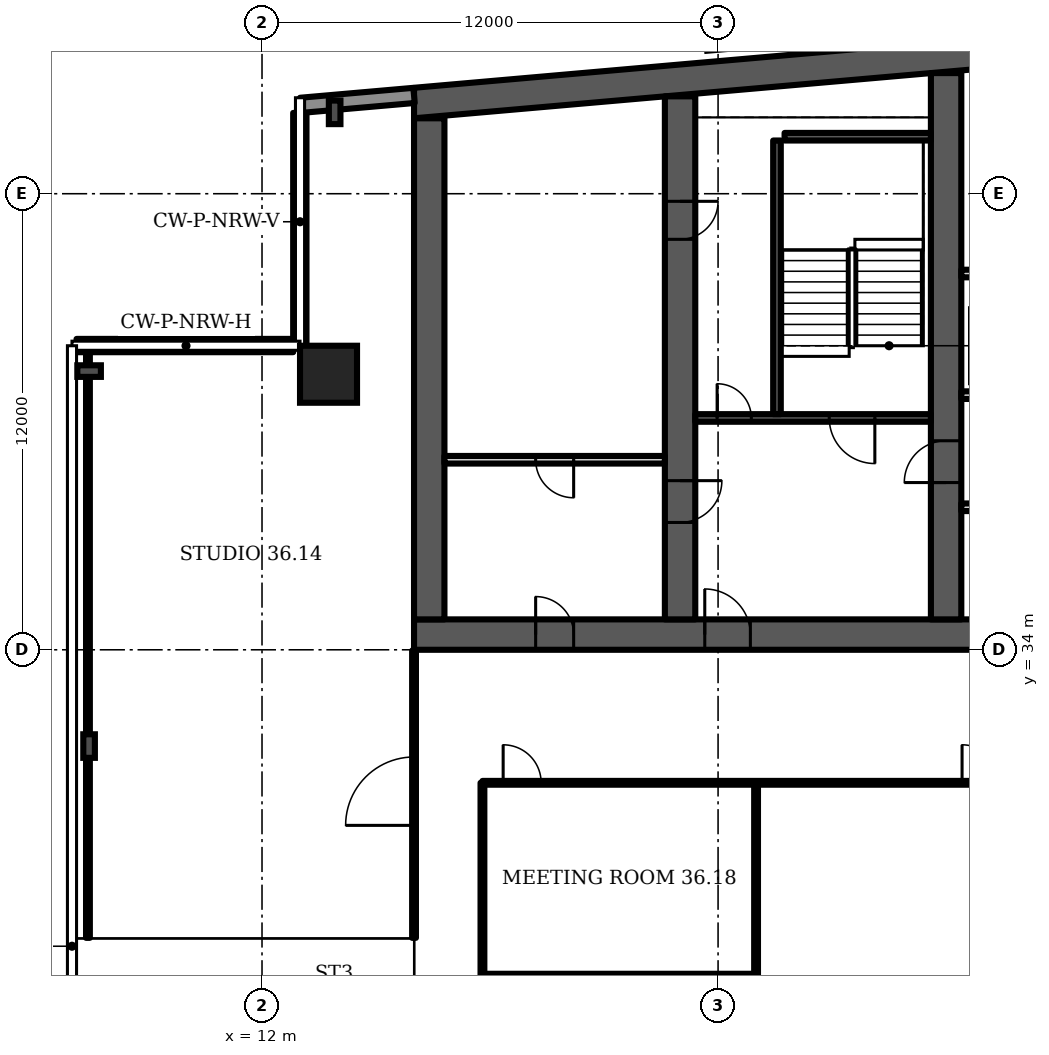
"""IFC4 building model, lengths in metres.
Left out: names, types, materials, properties, quantities, classifications, styles, units other than length and angle.
Written with IfcOpenShell. Run it as: python <this file> out.ifc"""

import sys

from ifc_helpers import new_model, si_unit, direction, frame, frame_2d, origin, origin_2d, place, context, subcontext, project, spatial, polyline, rectangle, i_section, outline, extrude, element, fill, save


model = new_model("IFC4")
c1 = context("Model", 3, precision=1e-05, world=origin(), true_north=direction((0.0, 1.0)))
c2 = subcontext(c1, "Body", "Model", "MODEL_VIEW")
j1 = project(units=[si_unit("LENGTHUNIT", "METRE"), si_unit("PLANEANGLEUNIT", "RADIAN")], contexts=[c1])
p1 = place(None, origin())
s1 = spatial("IfcSite", under=j1, at=p1, CompositionType="ELEMENT")
p2 = place(p1, origin())
s2 = spatial("IfcBuilding", under=s1, at=p2, CompositionType="ELEMENT")
p3 = place(p2, frame((0.0, 0.0, 151.9)))
s3 = spatial("IfcBuildingStorey", under=s2, at=p3, CompositionType="ELEMENT", Elevation=151.9)
p4 = place(p3, origin())
e1 = element("IfcWall", 1, at=p4, inside=s3, PredefinedType="SHEAR", context=c2, shape_type="SweptSolid", body=[
    extrude(outline(polyline([(16.0, 47.984), (37.0, 49.822), (58.0, 47.984), (58.0, 48.787), (37.0, 50.625), (16.0, 48.787), (16.0, 47.984)])), origin(), (0.0, 0.0, 1.0), 3.6),
])
p5 = place(p3, frame((16.0, 34.4, 0.0), z_axis=(0.0, 0.0, 1.0), x_axis=(1.0, 0.0, 0.0)))
e2 = element("IfcWall", 2, at=p5, inside=s3, PredefinedType="SHEAR", context=c2, shape_type="SweptSolid", body=[
    extrude(rectangle(XDim=42.0, YDim=0.8, at=frame_2d((21.0, 0.0))), origin(), (0.0, 0.0, 1.0), 3.6),
])
p6 = place(p5, frame((3.2, 0.0, 0.0)))
e3 = element("IfcOpeningElement", 3, at=p6, cuts=e2, PredefinedType="OPENING", context=c2, shape_type="SweptSolid", body=[
    extrude(rectangle(XDim=1.0, YDim=2.1, at=frame_2d((0.5, 1.05))), frame((0.0, 0.41, 0.0), z_axis=(0.0, -1.0, 0.0), x_axis=(1.0, 0.0, 0.0)), (0.0, 0.0, 1.0), 0.82),
])
p7 = place(p5, frame((7.65, 0.0, 0.0)))
e4 = element("IfcOpeningElement", 4, at=p7, cuts=e2, PredefinedType="OPENING", context=c2, shape_type="SweptSolid", body=[
    extrude(rectangle(XDim=1.2, YDim=2.1, at=frame_2d((0.6, 1.05))), frame((0.0, 0.41, 0.0), z_axis=(0.0, -1.0, 0.0), x_axis=(1.0, 0.0, 0.0)), (0.0, 0.0, 1.0), 0.82),
])
p8 = place(p5, frame((14.767, 0.0, 0.0)))
e5 = element("IfcOpeningElement", 5, at=p8, cuts=e2, PredefinedType="OPENING", context=c2, shape_type="SweptSolid", body=[
    extrude(rectangle(XDim=1.1, YDim=2.1, at=frame_2d((0.55, 1.05))), frame((0.0, 0.41, 0.0), z_axis=(0.0, -1.0, 0.0), x_axis=(1.0, 0.0, 0.0)), (0.0, 0.0, 1.0), 0.82),
])
p9 = place(p5, frame((19.133, 0.0, 0.0)))
e6 = element("IfcOpeningElement", 6, at=p9, cuts=e2, PredefinedType="OPENING", context=c2, shape_type="SweptSolid", body=[
    extrude(rectangle(XDim=1.1, YDim=2.1, at=frame_2d((0.55, 1.05))), frame((0.0, 0.41, 0.0), z_axis=(0.0, -1.0, 0.0), x_axis=(1.0, 0.0, 0.0)), (0.0, 0.0, 1.0), 0.82),
])
p10 = place(p5, frame((16.8, 0.0, 0.0)))
e7 = element("IfcOpeningElement", 7, at=p10, cuts=e2, PredefinedType="OPENING", context=c2, shape_type="SweptSolid", body=[
    extrude(rectangle(XDim=1.4, YDim=2.1, at=frame_2d((0.7, 1.05))), frame((0.0, 0.41, 0.0), z_axis=(0.0, -1.0, 0.0), x_axis=(1.0, 0.0, 0.0)), (0.0, 0.0, 1.0), 0.82),
])
p11 = place(p5, frame((21.767, 0.0, 0.0)))
e8 = element("IfcOpeningElement", 8, at=p11, cuts=e2, PredefinedType="OPENING", context=c2, shape_type="SweptSolid", body=[
    extrude(rectangle(XDim=1.1, YDim=2.1, at=frame_2d((0.55, 1.05))), frame((0.0, 0.41, 0.0), z_axis=(0.0, -1.0, 0.0), x_axis=(1.0, 0.0, 0.0)), (0.0, 0.0, 1.0), 0.82),
])
p12 = place(p5, frame((23.95, 0.0, 0.0)))
e9 = element("IfcOpeningElement", 9, at=p12, cuts=e2, PredefinedType="OPENING", context=c2, shape_type="SweptSolid", body=[
    extrude(rectangle(XDim=1.1, YDim=2.1, at=frame_2d((0.55, 1.05))), frame((0.0, 0.41, 0.0), z_axis=(0.0, -1.0, 0.0), x_axis=(1.0, 0.0, 0.0)), (0.0, 0.0, 1.0), 0.82),
])
p13 = place(p5, frame((26.133, 0.0, 0.0)))
e10 = element("IfcOpeningElement", 10, at=p13, cuts=e2, PredefinedType="OPENING", context=c2, shape_type="SweptSolid", body=[
    extrude(rectangle(XDim=1.1, YDim=2.1, at=frame_2d((0.55, 1.05))), frame((0.0, 0.41, 0.0), z_axis=(0.0, -1.0, 0.0), x_axis=(1.0, 0.0, 0.0)), (0.0, 0.0, 1.0), 0.82),
])
p14 = place(p5, frame((33.15, 0.0, 0.0)))
e11 = element("IfcOpeningElement", 11, at=p14, cuts=e2, PredefinedType="OPENING", context=c2, shape_type="SweptSolid", body=[
    extrude(rectangle(XDim=1.2, YDim=2.1, at=frame_2d((0.6, 1.05))), frame((0.0, 0.41, 0.0), z_axis=(0.0, -1.0, 0.0), x_axis=(1.0, 0.0, 0.0)), (0.0, 0.0, 1.0), 0.82),
])
p15 = place(p5, frame((35.817, 0.0, 0.0)))
e12 = element("IfcOpeningElement", 12, at=p15, cuts=e2, PredefinedType="OPENING", context=c2, shape_type="SweptSolid", body=[
    extrude(rectangle(XDim=1.0, YDim=2.1, at=frame_2d((0.5, 1.05))), frame((0.0, 0.41, 0.0), z_axis=(0.0, -1.0, 0.0), x_axis=(1.0, 0.0, 0.0)), (0.0, 0.0, 1.0), 0.82),
])
p16 = place(p5, frame((39.95, 0.0, 0.0)))
e13 = element("IfcOpeningElement", 13, at=p16, cuts=e2, PredefinedType="OPENING", context=c2, shape_type="SweptSolid", body=[
    extrude(rectangle(XDim=1.0, YDim=2.1, at=frame_2d((0.5, 1.05))), frame((0.0, 0.41, 0.0), z_axis=(0.0, -1.0, 0.0), x_axis=(1.0, 0.0, 0.0)), (0.0, 0.0, 1.0), 0.82),
])
p17 = place(p5, frame((37.767, 0.0, 0.0)))
e14 = element("IfcOpeningElement", 14, at=p17, cuts=e2, PredefinedType="OPENING", context=c2, shape_type="SweptSolid", body=[
    extrude(rectangle(XDim=1.4, YDim=2.1, at=frame_2d((0.7, 1.05))), frame((0.0, 0.41, 0.0), z_axis=(0.0, -1.0, 0.0), x_axis=(1.0, 0.0, 0.0)), (0.0, 0.0, 1.0), 0.82),
])
p18 = place(p3, frame((16.4, 34.8, 0.0), z_axis=(0.0, 0.0, 1.0), x_axis=(0.0, 1.0, 0.0)))
e15 = element("IfcWall", 15, at=p18, inside=s3, PredefinedType="SHEAR", context=c2, shape_type="SweptSolid", body=[
    extrude(rectangle(XDim=13.184, YDim=0.8, at=frame_2d((6.592, 0.0))), origin(), (0.0, 0.0, 1.0), 3.6),
])
p19 = place(p3, frame((23.0, 34.8, 0.0), z_axis=(0.0, 0.0, 1.0), x_axis=(0.0, 1.0, 0.0)))
e16 = element("IfcWall", 16, at=p19, inside=s3, PredefinedType="SHEAR", context=c2, shape_type="SweptSolid", body=[
    extrude(rectangle(XDim=13.762, YDim=0.8, at=frame_2d((6.881, 0.0))), origin(), (0.0, 0.0, 1.0), 3.6),
])
p20 = place(p19, frame((2.55, 0.0, 0.0)))
e17 = element("IfcOpeningElement", 17, at=p20, cuts=e16, PredefinedType="OPENING", context=c2, shape_type="SweptSolid", body=[
    extrude(rectangle(XDim=1.1, YDim=2.1, at=frame_2d((0.55, 1.05))), frame((0.0, 0.41, 0.0), z_axis=(0.0, -1.0, 0.0), x_axis=(1.0, 0.0, 0.0)), (0.0, 0.0, 1.0), 0.82),
])
p21 = place(p19, frame((10.0, 0.0, 0.0)))
e18 = element("IfcOpeningElement", 18, at=p21, cuts=e16, PredefinedType="OPENING", context=c2, shape_type="SweptSolid", body=[
    extrude(rectangle(XDim=1.0, YDim=2.1, at=frame_2d((0.5, 1.05))), frame((0.0, 0.41, 0.0), z_axis=(0.0, -1.0, 0.0), x_axis=(1.0, 0.0, 0.0)), (0.0, 0.0, 1.0), 0.82),
])
p22 = place(p3, frame((30.0, 34.8, 0.0), z_axis=(0.0, 0.0, 1.0), x_axis=(0.0, 1.0, 0.0)))
e19 = element("IfcWall", 19, at=p22, inside=s3, PredefinedType="SHEAR", context=c2, shape_type="SweptSolid", body=[
    extrude(rectangle(XDim=14.374, YDim=0.8, at=frame_2d((7.187, 0.0))), origin(), (0.0, 0.0, 1.0), 3.6),
])
p23 = place(p22, frame((3.6, 0.0, 0.0)))
e20 = element("IfcOpeningElement", 20, at=p23, cuts=e19, PredefinedType="OPENING", context=c2, shape_type="SweptSolid", body=[
    extrude(rectangle(XDim=1.1, YDim=2.1, at=frame_2d((0.55, 1.05))), frame((0.0, 0.41, 0.0), z_axis=(0.0, -1.0, 0.0), x_axis=(1.0, 0.0, 0.0)), (0.0, 0.0, 1.0), 0.82),
])
p24 = place(p3, frame((13.75, 41.25, 0.0), z_axis=(0.0, 0.0, 1.0), x_axis=(1.0, 0.0, 0.0)))
e21 = element("IfcColumn", 21, at=p24, inside=s3, PredefinedType="COLUMN", context=c2, shape_type="SweptSolid", body=[
    extrude(rectangle(XDim=1.5, YDim=1.5, at=origin_2d()), origin(), (0.0, 0.0, 1.0), 3.6),
])
for number, where, z_axis, x_axis in (
    (22, (13.911, 48.141, 0.0), (0.0, 0.0, 1.0), (-1.0, 0.0, 0.0)),
    (23, (7.45, 41.333, 0.0), (0.0, 0.0, 1.0), (0.0, 1.0, 0.0)),
    (24, (7.45, 31.467, 0.0), (0.0, 0.0, 1.0), (-1.0, 0.0, 0.0)),
):
    element("IfcColumn", number, at=place(p3, frame(where, z_axis=z_axis, x_axis=x_axis)), inside=s3, PredefinedType="COLUMN", context=c2, shape_type="SweptSolid", body=[
        extrude(i_section(OverallWidth=0.305, OverallDepth=0.62, WebThickness=0.021, FlangeThickness=0.04, FilletRadius=0.027, at=origin_2d()), origin(), (0.0, 0.0, 1.0), 3.6),
    ])
p25 = place(p3, frame((16.0, 48.587, 0.0), z_axis=(0.0, 0.0, 1.0), x_axis=(-0.996194, -0.087168, 0.0)))
e25 = element("IfcWall", 25, at=p25, inside=s3, PredefinedType="SOLIDWALL", context=c2, shape_type="SweptSolid", body=[
    extrude(rectangle(XDim=2.994, YDim=0.4, at=frame_2d((1.497, 0.0))), origin(), (0.0, 0.0, 1.0), 3.2),
])
p26 = place(p3, frame((12.995, 48.126, 0.0), z_axis=(0.0, 0.0, 1.0), x_axis=(0.0, -1.0, 0.0)))
e26 = element("IfcWall", 26, at=p26, inside=s3, PredefinedType="SOLIDWALL", context=c2, shape_type="SweptSolid", body=[
    extrude(rectangle(XDim=6.126, YDim=0.35, at=frame_2d((3.063, 0.0))), origin(), (0.0, 0.0, 1.0), 1.0),
])
p27 = place(p3, frame((12.82, 42.005, 0.0), z_axis=(0.0, 0.0, 1.0), x_axis=(-1.0, 0.0, 0.0)))
e27 = element("IfcWall", 27, at=p27, inside=s3, PredefinedType="SOLIDWALL", context=c2, shape_type="SweptSolid", body=[
    extrude(rectangle(XDim=5.7, YDim=0.35, at=frame_2d((2.85, 0.0))), origin(), (0.0, 0.0, 1.0), 1.0),
])
p28 = place(p3, frame((16.8, 39.0, 0.0), z_axis=(0.0, 0.0, 1.0), x_axis=(1.0, 0.0, 0.0)))
e28 = element("IfcWall", 28, at=p28, inside=s3, PredefinedType="PARTITIONING", context=c2, shape_type="SweptSolid", body=[
    extrude(rectangle(XDim=5.8, YDim=0.2, at=frame_2d((2.9, 0.0))), origin(), (0.0, 0.0, 1.0), 3.2),
])
p29 = place(p28, frame((2.4, 0.0, 0.0)))
e29 = element("IfcOpeningElement", 29, at=p29, cuts=e28, PredefinedType="OPENING", context=c2, shape_type="SweptSolid", body=[
    extrude(rectangle(XDim=1.0, YDim=2.1, at=frame_2d((0.5, 1.05))), frame((0.0, 0.11, 0.0), z_axis=(0.0, -1.0, 0.0), x_axis=(1.0, 0.0, 0.0)), (0.0, 0.0, 1.0), 0.22),
])
p30 = place(p3, frame((23.4, 40.1, 0.0), z_axis=(0.0, 0.0, 1.0), x_axis=(1.0, 0.0, 0.0)))
e30 = element("IfcWall", 30, at=p30, inside=s3, PredefinedType="SHEAR", context=c2, shape_type="SweptSolid", body=[
    extrude(rectangle(XDim=6.2, YDim=0.2, at=frame_2d((3.1, 0.0))), origin(), (0.0, 0.0, 1.0), 3.2),
])
p31 = place(p30, frame((3.525, 0.0, 0.0)))
e31 = element("IfcOpeningElement", 31, at=p31, cuts=e30, PredefinedType="OPENING", context=c2, shape_type="SweptSolid", body=[
    extrude(rectangle(XDim=1.2, YDim=2.1, at=frame_2d((0.6, 1.05))), frame((0.0, 0.11, 0.0), z_axis=(0.0, -1.0, 0.0), x_axis=(1.0, 0.0, 0.0)), (0.0, 0.0, 1.0), 0.22),
])
p32 = place(p30, frame((0.575, 0.0, 0.0)))
e32 = element("IfcOpeningElement", 32, at=p32, cuts=e30, PredefinedType="OPENING", context=c2, shape_type="SweptSolid", body=[
    extrude(rectangle(XDim=0.9, YDim=2.1, at=frame_2d((0.45, 1.05))), frame((0.0, 0.11, 0.0), z_axis=(0.0, -1.0, 0.0), x_axis=(1.0, 0.0, 0.0)), (0.0, 0.0, 1.0), 0.22),
])
p33 = place(p3, frame((25.55, 40.2, 0.0), z_axis=(0.0, 0.0, 1.0), x_axis=(0.0, 1.0, 0.0)))
e33 = element("IfcWall", 33, at=p33, inside=s3, PredefinedType="SHEAR", context=c2, shape_type="SweptSolid", body=[
    extrude(rectangle(XDim=7.2, YDim=0.2, at=frame_2d((3.6, 0.0))), origin(), (0.0, 0.0, 1.0), 3.2),
])
p34 = place(p3, frame((25.75, 47.5, 0.0), z_axis=(0.0, 0.0, 1.0), x_axis=(1.0, 0.0, 0.0)))
e34 = element("IfcWall", 34, at=p34, inside=s3, PredefinedType="SHEAR", context=c2, shape_type="SweptSolid", body=[
    extrude(rectangle(XDim=3.85, YDim=0.2, at=frame_2d((1.925, 0.0))), origin(), (0.0, 0.0, 1.0), 3.2),
])
p35 = place(p3, frame((30.4, 40.7, 0.0), z_axis=(0.0, 0.0, 1.0), x_axis=(1.0, 0.0, 0.0)))
e35 = element("IfcWall", 35, at=p35, inside=s3, PredefinedType="PARTITIONING", context=c2, shape_type="SweptSolid", body=[
    extrude(rectangle(XDim=6.2, YDim=0.2, at=frame_2d((3.1, 0.0))), origin(), (0.0, 0.0, 1.0), 3.2),
])
p36 = place(p35, frame((0.367, 0.0, 0.0)))
e36 = element("IfcOpeningElement", 36, at=p36, cuts=e35, PredefinedType="OPENING", context=c2, shape_type="SweptSolid", body=[
    extrude(rectangle(XDim=1.1, YDim=2.1, at=frame_2d((0.55, 1.05))), frame((0.0, 0.11, 0.0), z_axis=(0.0, -1.0, 0.0), x_axis=(1.0, 0.0, 0.0)), (0.0, 0.0, 1.0), 0.22),
])
p37 = place(p35, frame((2.55, 0.0, 0.0)))
e37 = element("IfcOpeningElement", 37, at=p37, cuts=e35, PredefinedType="OPENING", context=c2, shape_type="SweptSolid", body=[
    extrude(rectangle(XDim=1.1, YDim=2.1, at=frame_2d((0.55, 1.05))), frame((0.0, 0.11, 0.0), z_axis=(0.0, -1.0, 0.0), x_axis=(1.0, 0.0, 0.0)), (0.0, 0.0, 1.0), 0.22),
])
p38 = place(p35, frame((4.733, 0.0, 0.0)))
e38 = element("IfcOpeningElement", 38, at=p38, cuts=e35, PredefinedType="OPENING", context=c2, shape_type="SweptSolid", body=[
    extrude(rectangle(XDim=1.1, YDim=2.1, at=frame_2d((0.55, 1.05))), frame((0.0, 0.11, 0.0), z_axis=(0.0, -1.0, 0.0), x_axis=(1.0, 0.0, 0.0)), (0.0, 0.0, 1.0), 0.22),
])
p39 = place(p3, origin())
e39 = element("IfcWall", 39, at=p39, inside=s3, PredefinedType="PARTITIONING", context=c2, shape_type="SweptSolid", body=[
    extrude(outline(polyline([(32.233, 37.65), (30.4, 37.65), (30.4, 37.85), (32.233, 37.85), (32.433, 37.85), (32.433, 34.8), (32.233, 34.8), (32.233, 37.65)])), origin(), (0.0, 0.0, 1.0), 3.2),
])
p40 = place(p3, origin())
e40 = element("IfcWall", 40, at=p40, inside=s3, PredefinedType="PARTITIONING", context=c2, shape_type="SweptSolid", body=[
    extrude(outline(polyline([(32.433, 40.8), (32.233, 40.8), (32.233, 43.8), (30.4, 43.8), (30.4, 44.0), (36.6, 44.0), (36.6, 43.8), (34.767, 43.8), (34.767, 40.8), (34.567, 40.8), (34.567, 43.8), (32.433, 43.8), (32.433, 40.8)])), origin(), (0.0, 0.0, 1.0), 3.2),
])
p41 = place(p3, frame((7.42, 26.42, 0.0), z_axis=(0.0, 0.0, 1.0), x_axis=(0.0, 1.0, 0.0)))
e41 = element("IfcWall", 41, at=p41, inside=s3, PredefinedType="PARTITIONING", context=c2, shape_type="SweptSolid", body=[
    extrude(rectangle(XDim=15.56, YDim=0.1, at=frame_2d((7.78, 0.0))), origin(), (0.0, 0.0, 1.0), 2.58),
])
p42 = place(p3, frame((16.0, 26.42, 0.0), z_axis=(0.0, 0.0, 1.0), x_axis=(0.0, 1.0, 0.0)))
e42 = element("IfcWall", 42, at=p42, inside=s3, PredefinedType="PARTITIONING", context=c2, shape_type="SweptSolid", body=[
    extrude(rectangle(XDim=7.56, YDim=0.1, at=frame_2d((3.78, 0.0))), origin(), (0.0, 0.0, 1.0), 3.2),
])
p43 = place(p42, frame((2.96, 0.0, 0.0)))
e43 = element("IfcOpeningElement", 43, at=p43, cuts=e42, PredefinedType="OPENING", context=c2, shape_type="SweptSolid", body=[
    extrude(rectangle(XDim=1.8, YDim=2.1, at=frame_2d((0.9, 1.05))), frame((0.0, 0.06, 0.0), z_axis=(0.0, -1.0, 0.0), x_axis=(1.0, 0.0, 0.0)), (0.0, 0.0, 1.0), 0.12),
])
p44 = place(p3, frame((17.8, 24.135, 0.0), z_axis=(0.0, 0.0, 1.0), x_axis=(0.0, 1.0, 0.0)))
e44 = element("IfcWall", 44, at=p44, inside=s3, PredefinedType="PARTITIONING", context=c2, shape_type="SweptSolid", body=[
    extrude(rectangle(XDim=6.365, YDim=0.1, at=frame_2d((3.183, 0.0))), origin(), (0.0, 0.0, 1.0), 3.2),
])
p45 = place(p3, frame((17.8, 25.425, 0.0), z_axis=(0.0, 0.0, 1.0), x_axis=(1.0, 0.0, 0.0)))
e45 = element("IfcWall", 45, at=p45, inside=s3, PredefinedType="PARTITIONING", context=c2, shape_type="SweptSolid", body=[
    extrude(rectangle(XDim=7.2, YDim=0.1, at=frame_2d((3.6, 0.0))), origin(), (0.0, 0.0, 1.0), 3.2),
])
p46 = place(p3, frame((17.8, 30.5, 0.0), z_axis=(0.0, 0.0, 1.0), x_axis=(1.0, 0.0, 0.0)))
e46 = element("IfcWall", 46, at=p46, inside=s3, PredefinedType="PARTITIONING", context=c2, shape_type="SweptSolid", body=[
    extrude(rectangle(XDim=19.05, YDim=0.1, at=frame_2d((9.525, 0.0))), origin(), (0.0, 0.0, 1.0), 3.2),
])
p47 = place(p46, frame((0.545, 0.0, 0.0)))
e47 = element("IfcOpeningElement", 47, at=p47, cuts=e46, PredefinedType="OPENING", context=c2, shape_type="SweptSolid", body=[
    extrude(rectangle(XDim=1.0, YDim=2.1, at=frame_2d((0.5, 1.05))), frame((0.0, 0.06, 0.0), z_axis=(0.0, -1.0, 0.0), x_axis=(1.0, 0.0, 0.0)), (0.0, 0.0, 1.0), 0.12),
])
p48 = place(p46, frame((12.62, 0.0, 0.0)))
e48 = element("IfcOpeningElement", 48, at=p48, cuts=e46, PredefinedType="OPENING", context=c2, shape_type="SweptSolid", body=[
    extrude(rectangle(XDim=1.0, YDim=2.1, at=frame_2d((0.5, 1.05))), frame((0.0, 0.06, 0.0), z_axis=(0.0, -1.0, 0.0), x_axis=(1.0, 0.0, 0.0)), (0.0, 0.0, 1.0), 0.12),
])
p49 = place(p3, frame((25.0, 15.27, 0.0), z_axis=(0.0, 0.0, 1.0), x_axis=(0.0, 1.0, 0.0)))
e49 = element("IfcWall", 49, at=p49, inside=s3, PredefinedType="PARTITIONING", context=c2, shape_type="SweptSolid", body=[
    extrude(rectangle(XDim=15.23, YDim=0.1, at=frame_2d((7.615, 0.0))), origin(), (0.0, 0.0, 1.0), 3.2),
])
p50 = place(p6, origin())
e50 = element("IfcDoor", 50, at=p50, inside=s3, OperationType="SINGLE_SWING_LEFT", PredefinedType="DOOR", context=c2, shape_type="SweptSolid", body=[
    extrude(rectangle(XDim=1.0, YDim=2.1, at=frame_2d((0.5, 1.05))), frame((0.0, 0.4, 0.0), z_axis=(0.0, -1.0, 0.0), x_axis=(1.0, 0.0, 0.0)), (0.0, 0.0, 1.0), 0.8),
])
fill(e3, e50)
p51 = place(p29, origin())
e51 = element("IfcDoor", 51, at=p51, inside=s3, OperationType="SINGLE_SWING_RIGHT", PredefinedType="DOOR", context=c2, shape_type="SweptSolid", body=[
    extrude(rectangle(XDim=1.0, YDim=2.1, at=frame_2d((0.5, 1.05))), frame((0.0, 0.025, 0.0), z_axis=(0.0, -1.0, 0.0), x_axis=(1.0, 0.0, 0.0)), (0.0, 0.0, 1.0), 0.05),
])
fill(e29, e51)
p52 = place(p31, origin())
e52 = element("IfcDoor", 52, at=p52, inside=s3, OperationType="SINGLE_SWING_RIGHT", PredefinedType="DOOR", context=c2, shape_type="SweptSolid", body=[
    extrude(rectangle(XDim=1.2, YDim=2.1, at=frame_2d((0.6, 1.05))), frame((0.0, 0.025, 0.0), z_axis=(0.0, -1.0, 0.0), x_axis=(1.0, 0.0, 0.0)), (0.0, 0.0, 1.0), 0.05),
])
fill(e31, e52)
p53 = place(p32, origin())
e53 = element("IfcDoor", 53, at=p53, inside=s3, OperationType="SINGLE_SWING_LEFT", PredefinedType="DOOR", context=c2, shape_type="SweptSolid", body=[
    extrude(rectangle(XDim=0.9, YDim=2.1, at=frame_2d((0.45, 1.05))), frame((0.0, 0.025, 0.0), z_axis=(0.0, -1.0, 0.0), x_axis=(1.0, 0.0, 0.0)), (0.0, 0.0, 1.0), 0.05),
])
fill(e32, e53)
p54 = place(p7, origin())
e54 = element("IfcDoor", 54, at=p54, inside=s3, OperationType="SINGLE_SWING_LEFT", PredefinedType="DOOR", context=c2, shape_type="SweptSolid", body=[
    extrude(rectangle(XDim=1.2, YDim=2.1, at=frame_2d((0.6, 1.05))), frame((0.0, 0.025, 0.0), z_axis=(0.0, -1.0, 0.0), x_axis=(1.0, 0.0, 0.0)), (0.0, 0.0, 1.0), 0.05),
])
fill(e4, e54)
p55 = place(p20, origin())
e55 = element("IfcDoor", 55, at=p55, inside=s3, OperationType="SINGLE_SWING_RIGHT", PredefinedType="DOOR", context=c2, shape_type="SweptSolid", body=[
    extrude(rectangle(XDim=1.1, YDim=2.1, at=frame_2d((0.55, 1.05))), frame((0.0, 0.025, 0.0), z_axis=(0.0, -1.0, 0.0), x_axis=(1.0, 0.0, 0.0)), (0.0, 0.0, 1.0), 0.05),
])
fill(e17, e55)
p56 = place(p21, origin())
e56 = element("IfcDoor", 56, at=p56, inside=s3, OperationType="SINGLE_SWING_RIGHT", PredefinedType="DOOR", context=c2, shape_type="SweptSolid", body=[
    extrude(rectangle(XDim=1.0, YDim=2.1, at=frame_2d((0.5, 1.05))), frame((0.0, 0.4, 0.0), z_axis=(0.0, -1.0, 0.0), x_axis=(1.0, 0.0, 0.0)), (0.0, 0.0, 1.0), 0.8),
])
fill(e18, e56)
p57 = place(p23, origin())
e57 = element("IfcDoor", 57, at=p57, inside=s3, OperationType="SINGLE_SWING_LEFT", PredefinedType="DOOR", context=c2, shape_type="SweptSolid", body=[
    extrude(rectangle(XDim=1.1, YDim=2.1, at=frame_2d((0.55, 1.05))), frame((0.0, 0.025, 0.0), z_axis=(0.0, -1.0, 0.0), x_axis=(1.0, 0.0, 0.0)), (0.0, 0.0, 1.0), 0.05),
])
fill(e20, e57)
p58 = place(p43, origin())
e58 = element("IfcDoor", 58, at=p58, inside=s3, OperationType="DOUBLE_DOOR_SINGLE_SWING", PredefinedType="DOOR", context=c2, shape_type="SweptSolid", body=[
    extrude(rectangle(XDim=1.8, YDim=2.1, at=frame_2d((0.9, 1.05))), frame((0.0, 0.025, 0.0), z_axis=(0.0, -1.0, 0.0), x_axis=(1.0, 0.0, 0.0)), (0.0, 0.0, 1.0), 0.05),
])
fill(e43, e58)
p59 = place(p47, origin())
e59 = element("IfcDoor", 59, at=p59, inside=s3, OperationType="SINGLE_SWING_LEFT", PredefinedType="DOOR", context=c2, shape_type="SweptSolid", body=[
    extrude(rectangle(XDim=1.0, YDim=2.1, at=frame_2d((0.5, 1.05))), frame((0.0, 0.025, 0.0), z_axis=(0.0, -1.0, 0.0), x_axis=(1.0, 0.0, 0.0)), (0.0, 0.0, 1.0), 0.05),
])
fill(e47, e59)
p60 = place(p48, origin())
e60 = element("IfcDoor", 60, at=p60, inside=s3, OperationType="SINGLE_SWING_LEFT", PredefinedType="DOOR", context=c2, shape_type="SweptSolid", body=[
    extrude(rectangle(XDim=1.0, YDim=2.1, at=frame_2d((0.5, 1.05))), frame((0.0, 0.025, 0.0), z_axis=(0.0, -1.0, 0.0), x_axis=(1.0, 0.0, 0.0)), (0.0, 0.0, 1.0), 0.05),
])
fill(e48, e60)
save(model, sys.argv[1])
